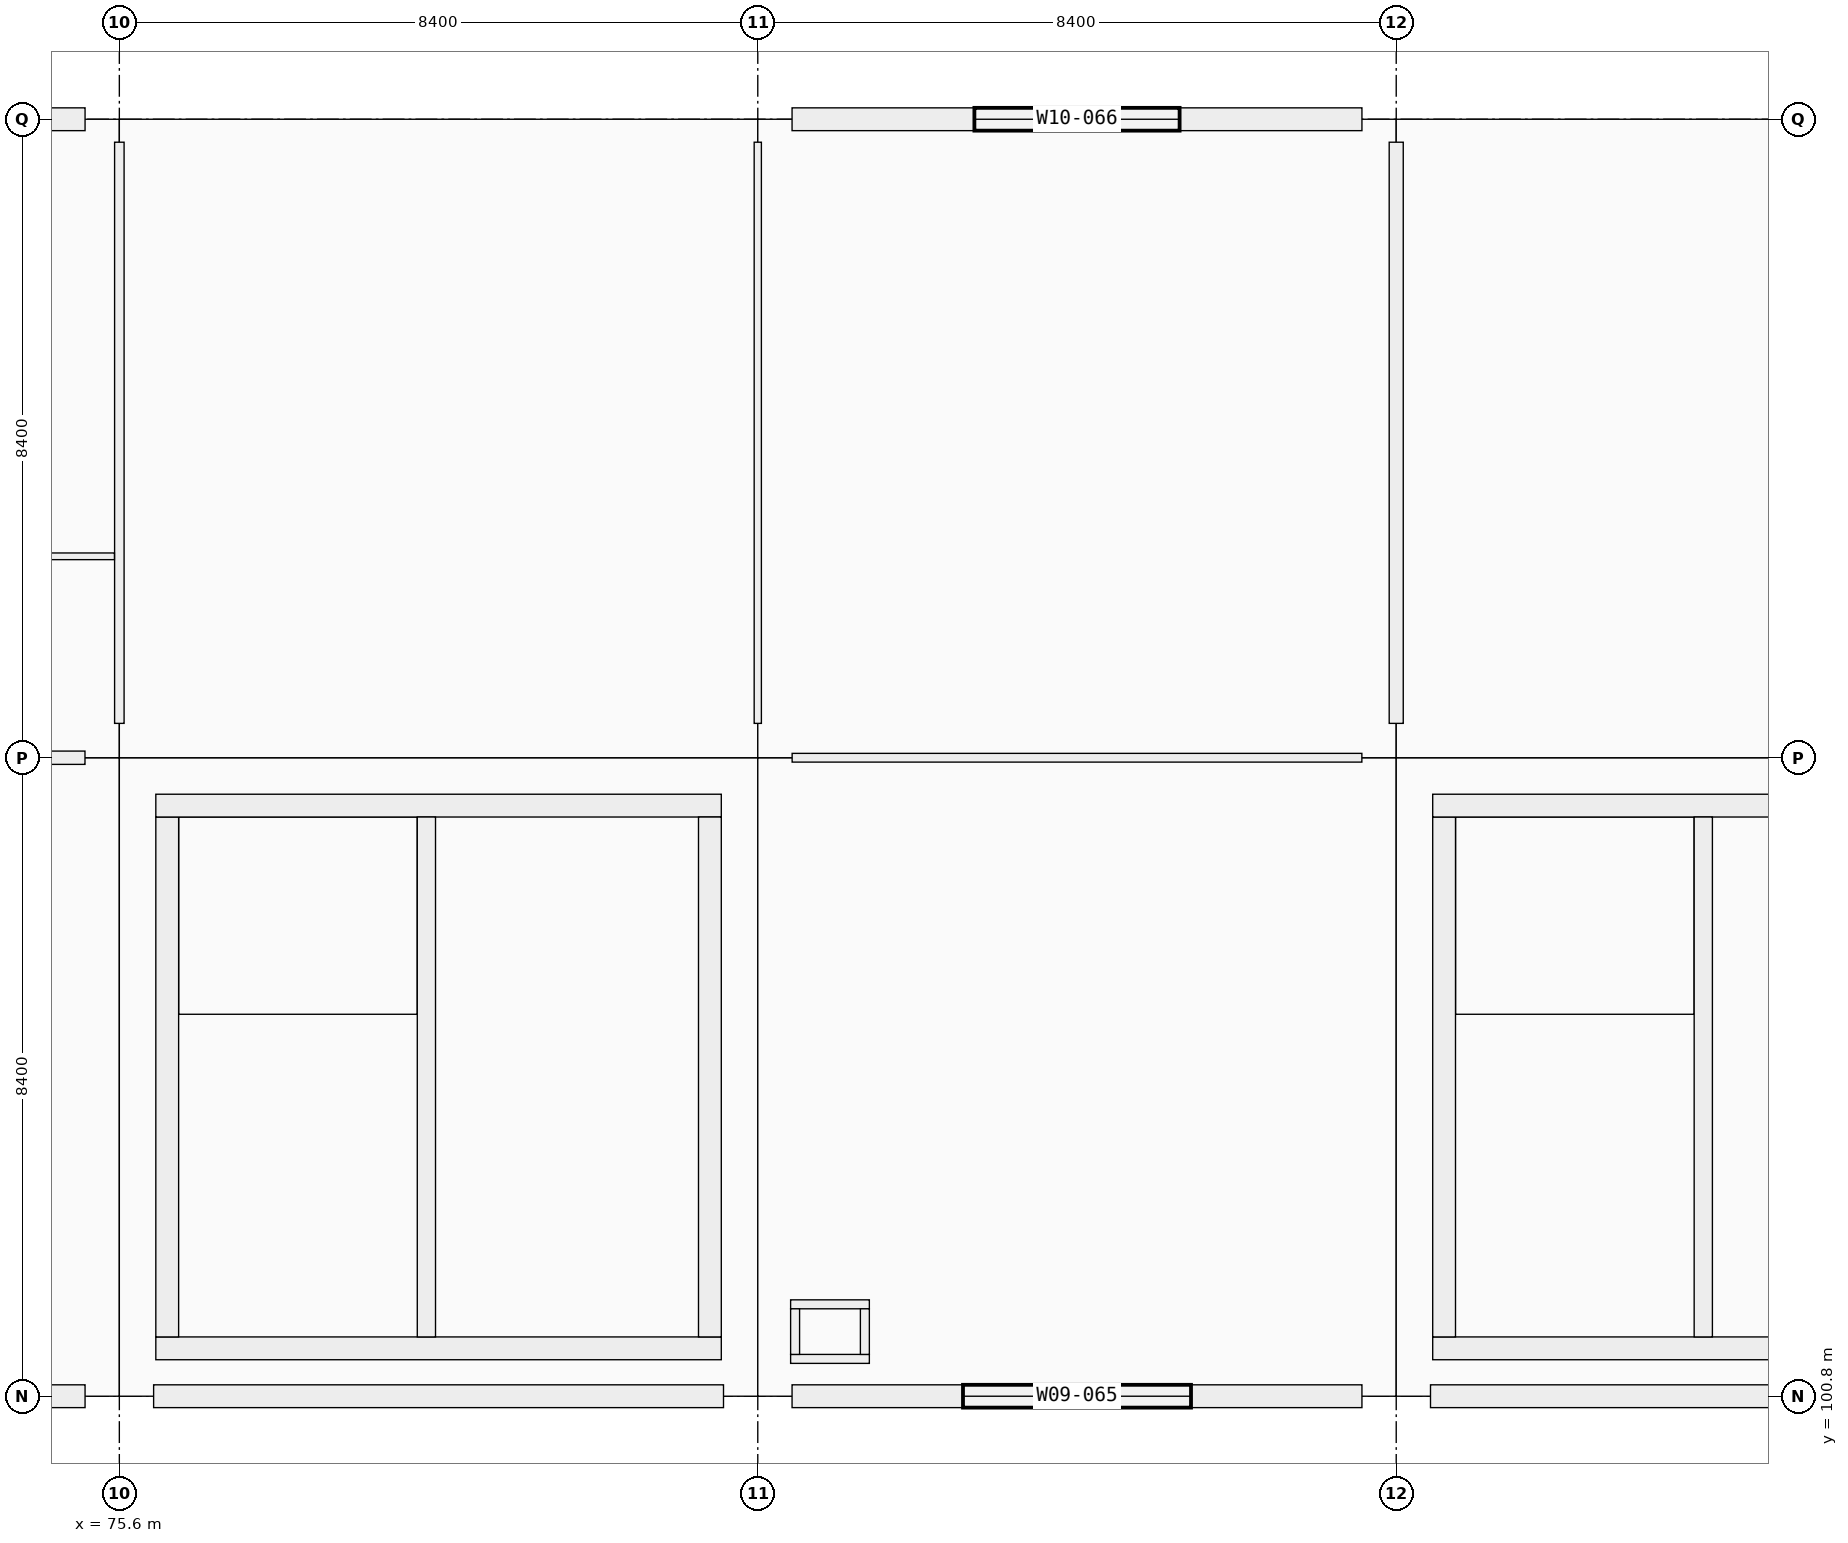
"""IFC4 building model, lengths in metres.
Left out: names, types, materials, properties, quantities, classifications, styles, units other than length and angle.
Written with IfcOpenShell. Run it as: python <this file> out.ifc"""

import sys

from ifc_helpers import new_model, si_unit, direction, frame, frame_2d, origin, origin_2d, place, context, subcontext, project, spatial, rectangle, extrude, element, fill, save


model = new_model("IFC4")
c1 = context("Model", 3, precision=1e-05, world=origin(), true_north=direction((0.0, 1.0)))
c2 = subcontext(c1, "Body", "Model", "MODEL_VIEW")
j1 = project(units=[si_unit("LENGTHUNIT", "METRE"), si_unit("PLANEANGLEUNIT", "RADIAN")], contexts=[c1])
p1 = place(None, origin())
s1 = spatial("IfcSite", under=j1, at=p1, CompositionType="ELEMENT")
p2 = place(p1, origin())
s2 = spatial("IfcBuilding", under=s1, at=p2, CompositionType="ELEMENT")
p3 = place(p2, frame((0.0, 0.0, 5.76)))
s3 = spatial("IfcBuildingStorey", under=s2, at=p3, CompositionType="ELEMENT", Elevation=5.76)
for number, where, z_axis, x_axis in (
    (1, (75.6, 100.8, 0.0), (0.0, 0.0, 1.0), (1.0, 0.0, 0.0)),
    (2, (75.6, 109.2, 0.0), (0.0, 0.0, 1.0), (1.0, 0.0, 0.0)),
):
    element("IfcColumn", number, at=place(p3, frame(where, z_axis=z_axis, x_axis=x_axis)), inside=s3, PredefinedType="COLUMN", context=c2, shape_type="SweptSolid", body=[
        extrude(rectangle(XDim=0.9, YDim=0.9, at=origin_2d()), origin(), (0.0, 0.0, 1.0), 4.5),
    ])
p4 = place(p3, frame((75.6, 117.6, 0.0), z_axis=(0.0, 0.0, 1.0), x_axis=(1.0, 0.0, 0.0)))
e3 = element("IfcColumn", 3, at=p4, inside=s3, PredefinedType="COLUMN", context=c2, shape_type="SweptSolid", body=[
    extrude(rectangle(XDim=0.9, YDim=0.6, at=origin_2d()), origin(), (0.0, 0.0, 1.0), 4.5),
])
for number, where, z_axis, x_axis in (
    (4, (84.0, 100.8, 0.0), (0.0, 0.0, 1.0), (1.0, 0.0, 0.0)),
    (5, (84.0, 109.2, 0.0), (0.0, 0.0, 1.0), (1.0, 0.0, 0.0)),
):
    element("IfcColumn", number, at=place(p3, frame(where, z_axis=z_axis, x_axis=x_axis)), inside=s3, PredefinedType="COLUMN", context=c2, shape_type="SweptSolid", body=[
        extrude(rectangle(XDim=0.9, YDim=0.9, at=origin_2d()), origin(), (0.0, 0.0, 1.0), 4.5),
    ])
p5 = place(p3, frame((84.0, 117.6, 0.0), z_axis=(0.0, 0.0, 1.0), x_axis=(1.0, 0.0, 0.0)))
e6 = element("IfcColumn", 6, at=p5, inside=s3, PredefinedType="COLUMN", context=c2, shape_type="SweptSolid", body=[
    extrude(rectangle(XDim=0.9, YDim=0.6, at=origin_2d()), origin(), (0.0, 0.0, 1.0), 4.5),
])
for number, where, z_axis, x_axis in (
    (7, (92.4, 100.8, 0.0), (0.0, 0.0, 1.0), (1.0, 0.0, 0.0)),
    (8, (92.4, 109.2, 0.0), (0.0, 0.0, 1.0), (1.0, 0.0, 0.0)),
):
    element("IfcColumn", number, at=place(p3, frame(where, z_axis=z_axis, x_axis=x_axis)), inside=s3, PredefinedType="COLUMN", context=c2, shape_type="SweptSolid", body=[
        extrude(rectangle(XDim=0.9, YDim=0.9, at=origin_2d()), origin(), (0.0, 0.0, 1.0), 4.5),
    ])
p6 = place(p3, frame((92.4, 117.6, 0.0), z_axis=(0.0, 0.0, 1.0), x_axis=(1.0, 0.0, 0.0)))
e9 = element("IfcColumn", 9, at=p6, inside=s3, PredefinedType="COLUMN", context=c2, shape_type="SweptSolid", body=[
    extrude(rectangle(XDim=0.9, YDim=0.6, at=origin_2d()), origin(), (0.0, 0.0, 1.0), 4.5),
])
p7 = place(p3, frame((75.149, 100.8, 0.0), z_axis=(0.0, 0.0, 1.0), x_axis=(-1.0, 0.0, 0.0)))
e10 = element("IfcWall", 10, at=p7, inside=s3, PredefinedType="SOLIDWALL", context=c2, shape_type="SweptSolid", body=[
    extrude(rectangle(XDim=7.498, YDim=0.3, at=frame_2d((3.749, 0.0))), origin(), (0.0, 0.0, 1.0), 3.4),
])
p8 = place(p7, frame((2.549, 0.0, 0.9)))
e11 = element("IfcOpeningElement", 11, at=p8, cuts=e10, PredefinedType="OPENING", context=c2, shape_type="SweptSolid", body=[
    extrude(rectangle(XDim=2.4, YDim=1.8, at=frame_2d((1.2, 0.9))), frame((0.0, 0.15, 0.0), z_axis=(0.0, -1.0, 0.0), x_axis=(1.0, 0.0, 0.0)), (0.0, 0.0, 1.0), 0.3),
])
p9 = place(p3, frame((67.651, 117.6, 0.0), z_axis=(0.0, 0.0, 1.0), x_axis=(1.0, 0.0, 0.0)))
e12 = element("IfcWall", 12, at=p9, inside=s3, PredefinedType="SOLIDWALL", context=c2, shape_type="SweptSolid", body=[
    extrude(rectangle(XDim=7.498, YDim=0.3, at=frame_2d((3.749, 0.0))), origin(), (0.0, 0.0, 1.0), 3.4),
])
p10 = place(p9, frame((2.999, 0.0, 0.9)))
e13 = element("IfcOpeningElement", 13, at=p10, cuts=e12, PredefinedType="OPENING", context=c2, shape_type="SweptSolid", body=[
    extrude(rectangle(XDim=1.5, YDim=1.8, at=frame_2d((0.75, 0.9))), frame((0.0, 0.15, 0.0), z_axis=(0.0, -1.0, 0.0), x_axis=(1.0, 0.0, 0.0)), (0.0, 0.0, 1.0), 0.3),
])
p11 = place(p3, frame((83.549, 100.8, 0.0), z_axis=(0.0, 0.0, 1.0), x_axis=(-1.0, 0.0, 0.0)))
e14 = element("IfcWall", 14, at=p11, inside=s3, PredefinedType="SOLIDWALL", context=c2, shape_type="SweptSolid", body=[
    extrude(rectangle(XDim=7.498, YDim=0.3, at=frame_2d((3.749, 0.0))), origin(), (0.0, 0.0, 1.0), 3.4),
])
p12 = place(p3, frame((91.949, 100.8, 0.0), z_axis=(0.0, 0.0, 1.0), x_axis=(-1.0, 0.0, 0.0)))
e15 = element("IfcWall", 15, at=p12, inside=s3, PredefinedType="SOLIDWALL", context=c2, shape_type="SweptSolid", body=[
    extrude(rectangle(XDim=7.498, YDim=0.3, at=frame_2d((3.749, 0.0))), origin(), (0.0, 0.0, 1.0), 3.4),
])
p13 = place(p12, frame((2.249, 0.0, 0.9)))
e16 = element("IfcOpeningElement", 16, at=p13, cuts=e15, PredefinedType="OPENING", context=c2, shape_type="SweptSolid", body=[
    extrude(rectangle(XDim=3.0, YDim=1.2, at=frame_2d((1.5, 0.6))), frame((0.0, 0.15, 0.0), z_axis=(0.0, -1.0, 0.0), x_axis=(1.0, 0.0, 0.0)), (0.0, 0.0, 1.0), 0.3),
])
p14 = place(p3, frame((84.451, 117.6, 0.0), z_axis=(0.0, 0.0, 1.0), x_axis=(1.0, 0.0, 0.0)))
e17 = element("IfcWall", 17, at=p14, inside=s3, PredefinedType="SOLIDWALL", context=c2, shape_type="SweptSolid", body=[
    extrude(rectangle(XDim=7.498, YDim=0.3, at=frame_2d((3.749, 0.0))), origin(), (0.0, 0.0, 1.0), 3.4),
])
p15 = place(p14, frame((2.399, 0.0, 0.9)))
e18 = element("IfcOpeningElement", 18, at=p15, cuts=e17, PredefinedType="OPENING", context=c2, shape_type="SweptSolid", body=[
    extrude(rectangle(XDim=2.7, YDim=1.2, at=frame_2d((1.35, 0.6))), frame((0.0, 0.15, 0.0), z_axis=(0.0, -1.0, 0.0), x_axis=(1.0, 0.0, 0.0)), (0.0, 0.0, 1.0), 0.3),
])
p16 = place(p3, frame((100.349, 100.8, 0.0), z_axis=(0.0, 0.0, 1.0), x_axis=(-1.0, 0.0, 0.0)))
e19 = element("IfcWall", 19, at=p16, inside=s3, PredefinedType="SOLIDWALL", context=c2, shape_type="SweptSolid", body=[
    extrude(rectangle(XDim=7.498, YDim=0.3, at=frame_2d((3.749, 0.0))), origin(), (0.0, 0.0, 1.0), 3.4),
])
p17 = place(p3, frame((83.52, 101.43, 0.0), z_axis=(0.0, 0.0, 1.0), x_axis=(-1.0, 0.0, 0.0)))
e20 = element("IfcWall", 20, at=p17, inside=s3, PredefinedType="SHEAR", context=c2, shape_type="SweptSolid", body=[
    extrude(rectangle(XDim=7.44, YDim=0.3, at=frame_2d((3.72, 0.0))), origin(), (0.0, 0.0, 1.0), 4.5),
])
p18 = place(p3, frame((76.23, 101.58, 0.0), z_axis=(0.0, 0.0, 1.0), x_axis=(0.0, 1.0, 0.0)))
e21 = element("IfcWall", 21, at=p18, inside=s3, PredefinedType="SHEAR", context=c2, shape_type="SweptSolid", body=[
    extrude(rectangle(XDim=6.84, YDim=0.3, at=frame_2d((3.42, 0.0))), origin(), (0.0, 0.0, 1.0), 4.5),
])
p19 = place(p3, frame((76.08, 108.57, 0.0), z_axis=(0.0, 0.0, 1.0), x_axis=(1.0, 0.0, 0.0)))
e22 = element("IfcWall", 22, at=p19, inside=s3, PredefinedType="SHEAR", context=c2, shape_type="SweptSolid", body=[
    extrude(rectangle(XDim=7.44, YDim=0.3, at=frame_2d((3.72, 0.0))), origin(), (0.0, 0.0, 1.0), 4.5),
])
p20 = place(p3, frame((83.37, 108.42, 0.0), z_axis=(0.0, 0.0, 1.0), x_axis=(0.0, -1.0, 0.0)))
e23 = element("IfcWall", 23, at=p20, inside=s3, PredefinedType="SHEAR", context=c2, shape_type="SweptSolid", body=[
    extrude(rectangle(XDim=6.84, YDim=0.3, at=frame_2d((3.42, 0.0))), origin(), (0.0, 0.0, 1.0), 4.5),
])
p21 = place(p20, frame((3.97, 0.0, 0.0)))
e24 = element("IfcOpeningElement", 24, at=p21, cuts=e23, PredefinedType="OPENING", context=c2, shape_type="SweptSolid", body=[
    extrude(rectangle(XDim=1.5, YDim=2.15, at=frame_2d((0.75, 1.075))), frame((0.0, 0.15, 0.0), z_axis=(0.0, -1.0, 0.0), x_axis=(1.0, 0.0, 0.0)), (0.0, 0.0, 1.0), 0.3),
])
p22 = place(p3, frame((79.64, 101.58, 0.0), z_axis=(0.0, 0.0, 1.0), x_axis=(0.0, 1.0, 0.0)))
e25 = element("IfcWall", 25, at=p22, inside=s3, PredefinedType="SHEAR", context=c2, shape_type="SweptSolid", body=[
    extrude(rectangle(XDim=6.84, YDim=0.24, at=frame_2d((3.42, 0.0))), origin(), (0.0, 0.0, 1.0), 4.5),
])
p23 = place(p22, frame((0.12, 0.0, 0.0)))
e26 = element("IfcOpeningElement", 26, at=p23, cuts=e25, PredefinedType="OPENING", context=c2, shape_type="SweptSolid", body=[
    extrude(rectangle(XDim=1.0, YDim=2.15, at=frame_2d((0.5, 1.075))), frame((0.0, 0.12, 0.0), z_axis=(0.0, -1.0, 0.0), x_axis=(1.0, 0.0, 0.0)), (0.0, 0.0, 1.0), 0.24),
])
p24 = place(p3, frame((100.32, 101.43, 0.0), z_axis=(0.0, 0.0, 1.0), x_axis=(-1.0, 0.0, 0.0)))
e27 = element("IfcWall", 27, at=p24, inside=s3, PredefinedType="SHEAR", context=c2, shape_type="SweptSolid", body=[
    extrude(rectangle(XDim=7.44, YDim=0.3, at=frame_2d((3.72, 0.0))), origin(), (0.0, 0.0, 1.0), 4.5),
])
p25 = place(p3, frame((93.03, 101.58, 0.0), z_axis=(0.0, 0.0, 1.0), x_axis=(0.0, 1.0, 0.0)))
e28 = element("IfcWall", 28, at=p25, inside=s3, PredefinedType="SHEAR", context=c2, shape_type="SweptSolid", body=[
    extrude(rectangle(XDim=6.84, YDim=0.3, at=frame_2d((3.42, 0.0))), origin(), (0.0, 0.0, 1.0), 4.5),
])
p26 = place(p3, frame((92.88, 108.57, 0.0), z_axis=(0.0, 0.0, 1.0), x_axis=(1.0, 0.0, 0.0)))
e29 = element("IfcWall", 29, at=p26, inside=s3, PredefinedType="SHEAR", context=c2, shape_type="SweptSolid", body=[
    extrude(rectangle(XDim=7.44, YDim=0.3, at=frame_2d((3.72, 0.0))), origin(), (0.0, 0.0, 1.0), 4.5),
])
p27 = place(p3, frame((96.44, 101.58, 0.0), z_axis=(0.0, 0.0, 1.0), x_axis=(0.0, 1.0, 0.0)))
e30 = element("IfcWall", 30, at=p27, inside=s3, PredefinedType="SHEAR", context=c2, shape_type="SweptSolid", body=[
    extrude(rectangle(XDim=6.84, YDim=0.24, at=frame_2d((3.42, 0.0))), origin(), (0.0, 0.0, 1.0), 4.5),
])
p28 = place(p27, frame((0.12, 0.0, 0.0)))
e31 = element("IfcOpeningElement", 31, at=p28, cuts=e30, PredefinedType="OPENING", context=c2, shape_type="SweptSolid", body=[
    extrude(rectangle(XDim=1.0, YDim=2.15, at=frame_2d((0.5, 1.075))), frame((0.0, 0.12, 0.0), z_axis=(0.0, -1.0, 0.0), x_axis=(1.0, 0.0, 0.0)), (0.0, 0.0, 1.0), 0.24),
])
for number, where, z_axis, x_axis in (
    (32, (84.432, 101.291, 0.0), (0.0, 0.0, 1.0), (1.0, 0.0, 0.0)),
    (33, (84.432, 102.009, 0.0), (0.0, 0.0, 1.0), (1.0, 0.0, 0.0)),
):
    element("IfcWall", number, at=place(p3, frame(where, z_axis=z_axis, x_axis=x_axis)), inside=s3, PredefinedType="PARTITIONING", context=c2, shape_type="SweptSolid", body=[
        extrude(rectangle(XDim=1.036, YDim=0.118, at=frame_2d((0.518, 0.0))), origin(), (0.0, 0.0, 1.0), 3.48),
    ])
for number, where, z_axis, x_axis in (
    (34, (84.491, 101.35, 0.0), (0.0, 0.0, 1.0), (0.0, 1.0, 0.0)),
    (35, (85.409, 101.35, 0.0), (0.0, 0.0, 1.0), (0.0, 1.0, 0.0)),
):
    element("IfcWall", number, at=place(p3, frame(where, z_axis=z_axis, x_axis=x_axis)), inside=s3, PredefinedType="PARTITIONING", context=c2, shape_type="SweptSolid", body=[
        extrude(rectangle(XDim=0.6, YDim=0.118, at=frame_2d((0.3, 0.0))), origin(), (0.0, 0.0, 1.0), 3.48),
    ])
p29 = place(p3, frame((67.652, 109.2, 0.0), z_axis=(0.0, 0.0, 1.0), x_axis=(1.0, 0.0, 0.0)))
e36 = element("IfcWall", 36, at=p29, inside=s3, PredefinedType="PARTITIONING", context=c2, shape_type="SweptSolid", body=[
    extrude(rectangle(XDim=7.496, YDim=0.175, at=frame_2d((3.748, 0.0))), origin(), (0.0, 0.0, 1.0), 2.4),
])
p30 = place(p3, frame((84.452, 109.2, 0.0), z_axis=(0.0, 0.0, 1.0), x_axis=(1.0, 0.0, 0.0)))
e37 = element("IfcWall", 37, at=p30, inside=s3, PredefinedType="PARTITIONING", context=c2, shape_type="SweptSolid", body=[
    extrude(rectangle(XDim=7.496, YDim=0.115, at=frame_2d((3.748, 0.0))), origin(), (0.0, 0.0, 1.0), 2.4),
])
p31 = place(p30, frame((3.218, 0.0, 0.0)))
e38 = element("IfcOpeningElement", 38, at=p31, cuts=e37, PredefinedType="OPENING", context=c2, shape_type="SweptSolid", body=[
    extrude(rectangle(XDim=1.06, YDim=2.22, at=frame_2d((0.53, 1.11))), frame((0.0, 0.058, 0.0), z_axis=(0.0, -1.0, 0.0), x_axis=(1.0, 0.0, 0.0)), (0.0, 0.0, 1.0), 0.115),
])
p32 = place(p3, frame((75.6, 109.652, 0.0), z_axis=(0.0, 0.0, 1.0), x_axis=(0.0, 1.0, 0.0)))
e39 = element("IfcWall", 39, at=p32, inside=s3, PredefinedType="PARTITIONING", context=c2, shape_type="SweptSolid", body=[
    extrude(rectangle(XDim=7.646, YDim=0.125, at=frame_2d((3.823, 0.0))), origin(), (0.0, 0.0, 1.0), 2.4),
])
p33 = place(p3, frame((84.0, 109.652, 0.0), z_axis=(0.0, 0.0, 1.0), x_axis=(0.0, 1.0, 0.0)))
e40 = element("IfcWall", 40, at=p33, inside=s3, PredefinedType="PARTITIONING", context=c2, shape_type="SweptSolid", body=[
    extrude(rectangle(XDim=7.646, YDim=0.095, at=frame_2d((3.823, 0.0))), origin(), (0.0, 0.0, 1.0), 2.4),
])
p34 = place(p33, frame((3.353, 0.0, 0.0)))
e41 = element("IfcOpeningElement", 41, at=p34, cuts=e40, PredefinedType="OPENING", context=c2, shape_type="SweptSolid", body=[
    extrude(rectangle(XDim=0.94, YDim=2.15, at=frame_2d((0.47, 1.075))), frame((0.0, 0.047, 0.0), z_axis=(0.0, -1.0, 0.0), x_axis=(1.0, 0.0, 0.0)), (0.0, 0.0, 1.0), 0.095),
])
p35 = place(p3, frame((92.4, 109.652, 0.0), z_axis=(0.0, 0.0, 1.0), x_axis=(0.0, 1.0, 0.0)))
e42 = element("IfcWall", 42, at=p35, inside=s3, PredefinedType="PARTITIONING", context=c2, shape_type="SweptSolid", body=[
    extrude(rectangle(XDim=7.646, YDim=0.185, at=frame_2d((3.823, 0.0))), origin(), (0.0, 0.0, 1.0), 2.4),
])
p36 = place(p35, frame((3.363, 0.0, 0.0)))
e43 = element("IfcOpeningElement", 43, at=p36, cuts=e42, PredefinedType="OPENING", context=c2, shape_type="SweptSolid", body=[
    extrude(rectangle(XDim=0.92, YDim=2.15, at=frame_2d((0.46, 1.075))), frame((0.0, 0.093, 0.0), z_axis=(0.0, -1.0, 0.0), x_axis=(1.0, 0.0, 0.0)), (0.0, 0.0, 1.0), 0.185),
])
p37 = place(p3, frame((67.28, 111.85, 0.0), z_axis=(0.0, 0.0, 1.0), x_axis=(1.0, 0.0, 0.0)))
e44 = element("IfcWall", 44, at=p37, inside=s3, PredefinedType="PARTITIONING", context=c2, shape_type="SweptSolid", body=[
    extrude(rectangle(XDim=8.256, YDim=0.088, at=frame_2d((4.128, 0.0))), origin(), (0.0, 0.0, 1.0), 2.4),
])
p38 = place(p13, origin())
e45 = element("IfcWindow", 45, at=p38, inside=s3, PartitioningType="SINGLE_PANEL", PredefinedType="WINDOW", context=c2, shape_type="SweptSolid", body=[
    extrude(rectangle(XDim=3.0, YDim=1.2, at=frame_2d((1.5, 0.6))), frame((0.0, 0.03, 0.0), z_axis=(0.0, -1.0, 0.0), x_axis=(1.0, 0.0, 0.0)), (0.0, 0.0, 1.0), 0.06),
])
fill(e16, e45)
p39 = place(p15, origin())
e46 = element("IfcWindow", 46, at=p39, inside=s3, PartitioningType="SINGLE_PANEL", PredefinedType="WINDOW", context=c2, shape_type="SweptSolid", body=[
    extrude(rectangle(XDim=2.7, YDim=1.2, at=frame_2d((1.35, 0.6))), frame((0.0, 0.03, 0.0), z_axis=(0.0, -1.0, 0.0), x_axis=(1.0, 0.0, 0.0)), (0.0, 0.0, 1.0), 0.06),
])
fill(e18, e46)
p40 = place(p23, origin())
e47 = element("IfcDoor", 47, at=p40, inside=s3, OperationType="SINGLE_SWING_RIGHT", PredefinedType="DOOR", context=c2, shape_type="SweptSolid", body=[
    extrude(rectangle(XDim=1.0, YDim=2.15, at=frame_2d((0.5, 1.075))), frame((0.0, 0.025, 0.0), z_axis=(0.0, -1.0, 0.0), x_axis=(1.0, 0.0, 0.0)), (0.0, 0.0, 1.0), 0.05),
])
fill(e26, e47)
p41 = place(p21, origin())
e48 = element("IfcDoor", 48, at=p41, inside=s3, OperationType="DOUBLE_DOOR_SINGLE_SWING", PredefinedType="DOOR", context=c2, shape_type="SweptSolid", body=[
    extrude(rectangle(XDim=1.5, YDim=2.15, at=frame_2d((0.75, 1.075))), frame((0.0, 0.025, 0.0), z_axis=(0.0, -1.0, 0.0), x_axis=(1.0, 0.0, 0.0)), (0.0, 0.0, 1.0), 0.05),
])
fill(e24, e48)
p42 = place(p28, origin())
e49 = element("IfcDoor", 49, at=p42, inside=s3, OperationType="SINGLE_SWING_LEFT", PredefinedType="DOOR", context=c2, shape_type="SweptSolid", body=[
    extrude(rectangle(XDim=1.0, YDim=2.15, at=frame_2d((0.5, 1.075))), frame((0.0, 0.025, 0.0), z_axis=(0.0, -1.0, 0.0), x_axis=(1.0, 0.0, 0.0)), (0.0, 0.0, 1.0), 0.05),
])
fill(e31, e49)
p43 = place(p31, origin())
e50 = element("IfcDoor", 50, at=p43, inside=s3, OperationType="SINGLE_SWING_RIGHT", PredefinedType="DOOR", context=c2, shape_type="SweptSolid", body=[
    extrude(rectangle(XDim=1.06, YDim=2.22, at=frame_2d((0.53, 1.11))), frame((0.0, 0.025, 0.0), z_axis=(0.0, -1.0, 0.0), x_axis=(1.0, 0.0, 0.0)), (0.0, 0.0, 1.0), 0.05),
])
fill(e38, e50)
p44 = place(p34, origin())
e51 = element("IfcDoor", 51, at=p44, inside=s3, OperationType="SINGLE_SWING_RIGHT", PredefinedType="DOOR", context=c2, shape_type="SweptSolid", body=[
    extrude(rectangle(XDim=0.94, YDim=2.15, at=frame_2d((0.47, 1.075))), frame((0.0, 0.025, 0.0), z_axis=(0.0, -1.0, 0.0), x_axis=(1.0, 0.0, 0.0)), (0.0, 0.0, 1.0), 0.05),
])
fill(e41, e51)
p45 = place(p36, origin())
e52 = element("IfcDoor", 52, at=p45, inside=s3, OperationType="SINGLE_SWING_LEFT", PredefinedType="DOOR", context=c2, shape_type="SweptSolid", body=[
    extrude(rectangle(XDim=0.92, YDim=2.15, at=frame_2d((0.46, 1.075))), frame((0.0, 0.025, 0.0), z_axis=(0.0, -1.0, 0.0), x_axis=(1.0, 0.0, 0.0)), (0.0, 0.0, 1.0), 0.05),
])
fill(e43, e52)
save(model, sys.argv[1])
